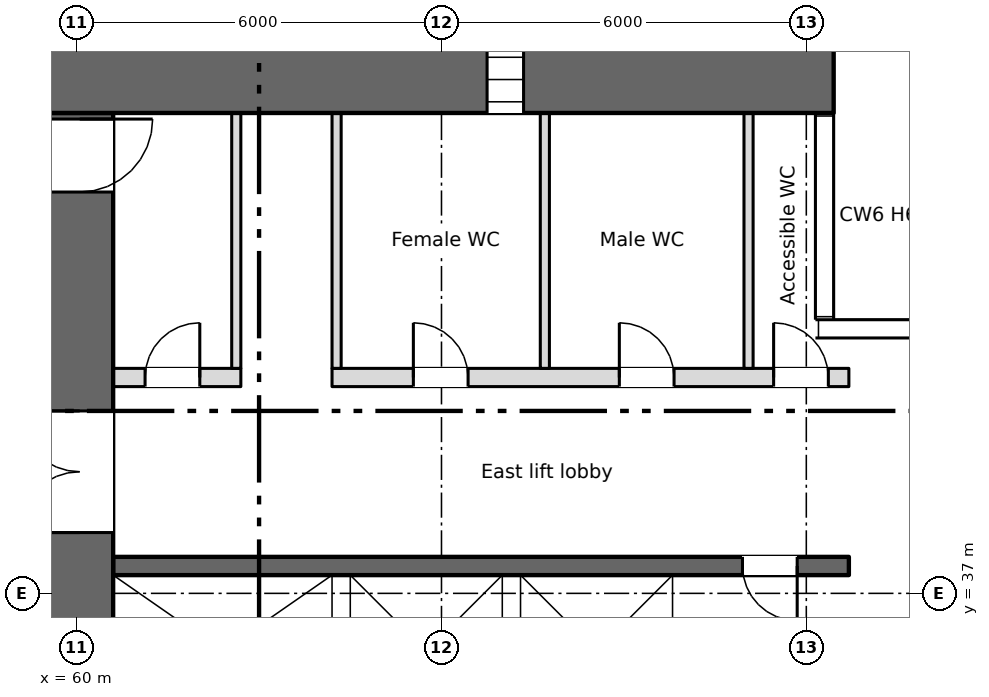
"""IFC4 building model, lengths in metres.
Left out: names, types, materials, properties, quantities, classifications, styles, units other than length and angle.
Written with IfcOpenShell. Run it as: python <this file> out.ifc"""

import sys

from ifc_helpers import new_model, si_unit, direction, frame, frame_2d, origin, place, context, subcontext, project, spatial, rectangle, extrude, element, fill, save


model = new_model("IFC4")
c1 = context("Model", 3, precision=1e-05, world=origin(), true_north=direction((0.0, 1.0)))
c2 = subcontext(c1, "Body", "Model", "MODEL_VIEW")
j1 = project(units=[si_unit("LENGTHUNIT", "METRE"), si_unit("PLANEANGLEUNIT", "RADIAN")], contexts=[c1])
p1 = place(None, origin())
s1 = spatial("IfcSite", under=j1, at=p1, CompositionType="ELEMENT")
p2 = place(p1, origin())
s2 = spatial("IfcBuilding", under=s1, at=p2, CompositionType="ELEMENT")
p3 = place(p2, frame((0.0, 0.0, 11.3)))
s3 = spatial("IfcBuildingStorey", under=s2, at=p3, CompositionType="ELEMENT", Elevation=11.3)
p4 = place(p3, frame((5.55, 45.45, 0.0), z_axis=(0.0, 0.0, 1.0), x_axis=(1.0, 0.0, 0.0)))
e1 = element("IfcWall", 1, at=p4, inside=s3, PredefinedType="SHEAR", context=c2, shape_type="SweptSolid", body=[
    extrude(rectangle(XDim=66.9, YDim=1.1, at=frame_2d((33.45, 0.0))), origin(), (0.0, 0.0, 1.0), 6.1),
])
p5 = place(p4, frame((1.2, 0.0, 0.6)))
e2 = element("IfcOpeningElement", 2, at=p5, cuts=e1, PredefinedType="OPENING", context=c2, shape_type="SweptSolid", body=[
    extrude(rectangle(XDim=0.6, YDim=2.7, at=frame_2d((0.3, 1.35))), frame((0.0, 0.56, 0.0), z_axis=(0.0, -1.0, 0.0), x_axis=(1.0, 0.0, 0.0)), (0.0, 0.0, 1.0), 1.12),
])
p6 = place(p4, frame((7.2, 0.0, 0.6)))
e3 = element("IfcOpeningElement", 3, at=p6, cuts=e1, PredefinedType="OPENING", context=c2, shape_type="SweptSolid", body=[
    extrude(rectangle(XDim=0.6, YDim=2.7, at=frame_2d((0.3, 1.35))), frame((0.0, 0.56, 0.0), z_axis=(0.0, -1.0, 0.0), x_axis=(1.0, 0.0, 0.0)), (0.0, 0.0, 1.0), 1.12),
])
p7 = place(p4, frame((61.2, 0.0, 0.6)))
e4 = element("IfcOpeningElement", 4, at=p7, cuts=e1, PredefinedType="OPENING", context=c2, shape_type="SweptSolid", body=[
    extrude(rectangle(XDim=0.6, YDim=2.7, at=frame_2d((0.3, 1.35))), frame((0.0, 0.56, 0.0), z_axis=(0.0, -1.0, 0.0), x_axis=(1.0, 0.0, 0.0)), (0.0, 0.0, 1.0), 1.12),
])
p8 = place(p3, frame((72.85, 28.4, 0.0), z_axis=(0.0, 0.0, 1.0), x_axis=(0.0, 1.0, 0.0)))
e5 = element("IfcWall", 5, at=p8, inside=s3, PredefinedType="SHEAR", context=c2, shape_type="SweptSolid", body=[
    extrude(rectangle(XDim=12.85, YDim=0.3, at=frame_2d((6.425, 0.0))), origin(), (0.0, 0.0, 1.0), 6.1),
])
p9 = place(p3, frame((64.35, 34.8, 0.0), z_axis=(0.0, 0.0, 1.0), x_axis=(0.0, 1.0, 0.0)))
e6 = element("IfcWall", 6, at=p9, inside=s3, PredefinedType="SHEAR", context=c2, shape_type="SweptSolid", body=[
    extrude(rectangle(XDim=2.5, YDim=0.3, at=frame_2d((1.25, 0.0))), origin(), (0.0, 0.0, 1.0), 6.1),
])
p10 = place(p3, frame((60.05, 28.4, 0.0), z_axis=(0.0, 0.0, 1.0), x_axis=(0.0, 1.0, 0.0)))
e7 = element("IfcWall", 7, at=p10, inside=s3, PredefinedType="SHEAR", context=c2, shape_type="SweptSolid", body=[
    extrude(rectangle(XDim=16.5, YDim=1.1, at=frame_2d((8.25, 0.0))), origin(), (0.0, 0.0, 1.0), 6.1),
])
p11 = place(p10, frame((9.6, 0.0, 0.0)))
e8 = element("IfcOpeningElement", 8, at=p11, cuts=e7, PredefinedType="OPENING", context=c2, shape_type="SweptSolid", body=[
    extrude(rectangle(XDim=2.0, YDim=2.1, at=frame_2d((1.0, 1.05))), frame((0.0, 0.56, 0.0), z_axis=(0.0, -1.0, 0.0), x_axis=(1.0, 0.0, 0.0)), (0.0, 0.0, 1.0), 1.12),
])
p12 = place(p10, frame((15.2, 0.0, 0.0)))
e9 = element("IfcOpeningElement", 9, at=p12, cuts=e7, PredefinedType="OPENING", context=c2, shape_type="SweptSolid", body=[
    extrude(rectangle(XDim=1.2, YDim=2.1, at=frame_2d((0.6, 1.05))), frame((0.0, 0.56, 0.0), z_axis=(0.0, -1.0, 0.0), x_axis=(1.0, 0.0, 0.0)), (0.0, 0.0, 1.0), 1.12),
])
p13 = place(p3, frame((72.7, 37.45, 0.0), z_axis=(0.0, 0.0, 1.0), x_axis=(-1.0, 0.0, 0.0)))
e10 = element("IfcWall", 10, at=p13, inside=s3, PredefinedType="SHEAR", context=c2, shape_type="SweptSolid", body=[
    extrude(rectangle(XDim=12.1, YDim=0.3, at=frame_2d((6.05, 0.0))), origin(), (0.0, 0.0, 1.0), 6.1),
])
p14 = place(p13, frame((0.85, 0.0, 0.0)))
e11 = element("IfcOpeningElement", 11, at=p14, cuts=e10, PredefinedType="OPENING", context=c2, shape_type="SweptSolid", body=[
    extrude(rectangle(XDim=0.9, YDim=2.1, at=frame_2d((0.45, 1.05))), frame((0.0, 0.16, 0.0), z_axis=(0.0, -1.0, 0.0), x_axis=(1.0, 0.0, 0.0)), (0.0, 0.0, 1.0), 0.32),
])
p15 = place(p13, frame((9.75, 0.0, 0.0)))
e12 = element("IfcOpeningElement", 12, at=p15, cuts=e10, PredefinedType="OPENING", context=c2, shape_type="SweptSolid", body=[
    extrude(rectangle(XDim=1.1, YDim=2.1, at=frame_2d((0.55, 1.05))), frame((0.0, 0.16, 0.0), z_axis=(0.0, -1.0, 0.0), x_axis=(1.0, 0.0, 0.0)), (0.0, 0.0, 1.0), 0.32),
])
p16 = place(p13, frame((6.4, 0.0, 0.0)))
e13 = element("IfcOpeningElement", 13, at=p16, cuts=e10, PredefinedType="OPENING", context=c2, shape_type="SweptSolid", body=[
    extrude(rectangle(XDim=1.1, YDim=2.1, at=frame_2d((0.55, 1.05))), frame((0.0, 0.16, 0.0), z_axis=(0.0, -1.0, 0.0), x_axis=(1.0, 0.0, 0.0)), (0.0, 0.0, 1.0), 0.32),
])
p17 = place(p13, frame((3.6, 0.0, 0.0)))
e14 = element("IfcOpeningElement", 14, at=p17, cuts=e10, PredefinedType="OPENING", context=c2, shape_type="SweptSolid", body=[
    extrude(rectangle(XDim=1.1, YDim=2.1, at=frame_2d((0.55, 1.05))), frame((0.0, 0.16, 0.0), z_axis=(0.0, -1.0, 0.0), x_axis=(1.0, 0.0, 0.0)), (0.0, 0.0, 1.0), 0.32),
])
p18 = place(p3, frame((60.6, 40.55, 0.0), z_axis=(0.0, 0.0, 1.0), x_axis=(1.0, 0.0, 0.0)))
e15 = element("IfcWall", 15, at=p18, inside=s3, PredefinedType="PARTITIONING", context=c2, shape_type="SweptSolid", body=[
    extrude(rectangle(XDim=2.1, YDim=0.3, at=frame_2d((1.05, 0.0))), origin(), (0.0, 0.0, 1.0), 6.1),
])
p19 = place(p18, frame((0.525, 0.0, 0.0)))
e16 = element("IfcOpeningElement", 16, at=p19, cuts=e15, PredefinedType="OPENING", context=c2, shape_type="SweptSolid", body=[
    extrude(rectangle(XDim=0.9, YDim=2.1, at=frame_2d((0.45, 1.05))), frame((0.0, 0.16, 0.0), z_axis=(0.0, -1.0, 0.0), x_axis=(1.0, 0.0, 0.0)), (0.0, 0.0, 1.0), 0.32),
])
p20 = place(p3, frame((64.2, 40.55, 0.0), z_axis=(0.0, 0.0, 1.0), x_axis=(1.0, 0.0, 0.0)))
e17 = element("IfcWall", 17, at=p20, inside=s3, PredefinedType="PARTITIONING", context=c2, shape_type="SweptSolid", body=[
    extrude(rectangle(XDim=8.5, YDim=0.3, at=frame_2d((4.25, 0.0))), origin(), (0.0, 0.0, 1.0), 6.1),
])
p21 = place(p20, frame((1.337, 0.0, 0.0)))
e18 = element("IfcOpeningElement", 18, at=p21, cuts=e17, PredefinedType="OPENING", context=c2, shape_type="SweptSolid", body=[
    extrude(rectangle(XDim=0.9, YDim=2.1, at=frame_2d((0.45, 1.05))), frame((0.0, 0.16, 0.0), z_axis=(0.0, -1.0, 0.0), x_axis=(1.0, 0.0, 0.0)), (0.0, 0.0, 1.0), 0.32),
])
p22 = place(p20, frame((4.725, 0.0, 0.0)))
e19 = element("IfcOpeningElement", 19, at=p22, cuts=e17, PredefinedType="OPENING", context=c2, shape_type="SweptSolid", body=[
    extrude(rectangle(XDim=0.9, YDim=2.1, at=frame_2d((0.45, 1.05))), frame((0.0, 0.16, 0.0), z_axis=(0.0, -1.0, 0.0), x_axis=(1.0, 0.0, 0.0)), (0.0, 0.0, 1.0), 0.32),
])
p23 = place(p20, frame((7.262, 0.0, 0.0)))
e20 = element("IfcOpeningElement", 20, at=p23, cuts=e17, PredefinedType="OPENING", context=c2, shape_type="SweptSolid", body=[
    extrude(rectangle(XDim=0.9, YDim=2.1, at=frame_2d((0.45, 1.05))), frame((0.0, 0.16, 0.0), z_axis=(0.0, -1.0, 0.0), x_axis=(1.0, 0.0, 0.0)), (0.0, 0.0, 1.0), 0.32),
])
for number, where, z_axis, x_axis in (
    (21, (67.15, 34.8, 0.0), (0.0, 0.0, 1.0), (0.0, 1.0, 0.0)),
    (22, (69.95, 34.8, 0.0), (0.0, 0.0, 1.0), (0.0, 1.0, 0.0)),
):
    element("IfcWall", number, at=place(p3, frame(where, z_axis=z_axis, x_axis=x_axis)), inside=s3, PredefinedType="SHEAR", context=c2, shape_type="SweptSolid", body=[
        extrude(rectangle(XDim=2.5, YDim=0.3, at=frame_2d((1.25, 0.0))), origin(), (0.0, 0.0, 1.0), 6.1),
    ])
for number, where, z_axis, x_axis in (
    (23, (62.625, 40.7, 0.0), (0.0, 0.0, 1.0), (0.0, 1.0, 0.0)),
    (24, (64.275, 40.7, 0.0), (0.0, 0.0, 1.0), (0.0, 1.0, 0.0)),
    (25, (67.7, 40.7, 0.0), (0.0, 0.0, 1.0), (0.0, 1.0, 0.0)),
    (26, (71.05, 40.7, 0.0), (0.0, 0.0, 1.0), (0.0, 1.0, 0.0)),
):
    element("IfcWall", number, at=place(p3, frame(where, z_axis=z_axis, x_axis=x_axis)), inside=s3, PredefinedType="PARTITIONING", context=c2, shape_type="SweptSolid", body=[
        extrude(rectangle(XDim=4.2, YDim=0.15, at=frame_2d((2.1, 0.0))), origin(), (0.0, 0.0, 1.0), 6.1),
    ])
p24 = place(p7, origin())
e27 = element("IfcWindow", 27, at=p24, inside=s3, PartitioningType="SINGLE_PANEL", PredefinedType="WINDOW", context=c2, shape_type="SweptSolid", body=[
    extrude(rectangle(XDim=0.6, YDim=2.7, at=frame_2d((0.3, 1.35))), frame((0.0, 0.03, 0.0), z_axis=(0.0, -1.0, 0.0), x_axis=(1.0, 0.0, 0.0)), (0.0, 0.0, 1.0), 0.06),
])
fill(e4, e27)
p25 = place(p19, origin())
e28 = element("IfcDoor", 28, at=p25, inside=s3, OperationType="SINGLE_SWING_RIGHT", PredefinedType="DOOR", context=c2, shape_type="SweptSolid", body=[
    extrude(rectangle(XDim=0.9, YDim=2.1, at=frame_2d((0.45, 1.05))), frame((0.0, 0.025, 0.0), z_axis=(0.0, -1.0, 0.0), x_axis=(1.0, 0.0, 0.0)), (0.0, 0.0, 1.0), 0.05),
])
fill(e16, e28)
p26 = place(p21, origin())
e29 = element("IfcDoor", 29, at=p26, inside=s3, OperationType="SINGLE_SWING_LEFT", PredefinedType="DOOR", context=c2, shape_type="SweptSolid", body=[
    extrude(rectangle(XDim=0.9, YDim=2.1, at=frame_2d((0.45, 1.05))), frame((0.0, 0.025, 0.0), z_axis=(0.0, -1.0, 0.0), x_axis=(1.0, 0.0, 0.0)), (0.0, 0.0, 1.0), 0.05),
])
fill(e18, e29)
p27 = place(p22, origin())
e30 = element("IfcDoor", 30, at=p27, inside=s3, OperationType="SINGLE_SWING_LEFT", PredefinedType="DOOR", context=c2, shape_type="SweptSolid", body=[
    extrude(rectangle(XDim=0.9, YDim=2.1, at=frame_2d((0.45, 1.05))), frame((0.0, 0.025, 0.0), z_axis=(0.0, -1.0, 0.0), x_axis=(1.0, 0.0, 0.0)), (0.0, 0.0, 1.0), 0.05),
])
fill(e19, e30)
p28 = place(p23, origin())
e31 = element("IfcDoor", 31, at=p28, inside=s3, OperationType="SINGLE_SWING_LEFT", PredefinedType="DOOR", context=c2, shape_type="SweptSolid", body=[
    extrude(rectangle(XDim=0.9, YDim=2.1, at=frame_2d((0.45, 1.05))), frame((0.0, 0.025, 0.0), z_axis=(0.0, -1.0, 0.0), x_axis=(1.0, 0.0, 0.0)), (0.0, 0.0, 1.0), 0.05),
])
fill(e20, e31)
p29 = place(p14, origin())
e32 = element("IfcDoor", 32, at=p29, inside=s3, OperationType="SINGLE_SWING_LEFT", PredefinedType="DOOR", context=c2, shape_type="SweptSolid", body=[
    extrude(rectangle(XDim=0.9, YDim=2.1, at=frame_2d((0.45, 1.05))), frame((0.0, 0.025, 0.0), z_axis=(0.0, -1.0, 0.0), x_axis=(1.0, 0.0, 0.0)), (0.0, 0.0, 1.0), 0.05),
])
fill(e11, e32)
p30 = place(p15, origin())
e33 = element("IfcDoor", 33, at=p30, inside=s3, OperationType="SLIDING_TO_LEFT", PredefinedType="DOOR", context=c2, shape_type="SweptSolid", body=[
    extrude(rectangle(XDim=1.1, YDim=2.1, at=frame_2d((0.55, 1.05))), frame((0.0, 0.025, 0.0), z_axis=(0.0, -1.0, 0.0), x_axis=(1.0, 0.0, 0.0)), (0.0, 0.0, 1.0), 0.05),
])
fill(e12, e33)
p31 = place(p16, origin())
e34 = element("IfcDoor", 34, at=p31, inside=s3, OperationType="SLIDING_TO_LEFT", PredefinedType="DOOR", context=c2, shape_type="SweptSolid", body=[
    extrude(rectangle(XDim=1.1, YDim=2.1, at=frame_2d((0.55, 1.05))), frame((0.0, 0.025, 0.0), z_axis=(0.0, -1.0, 0.0), x_axis=(1.0, 0.0, 0.0)), (0.0, 0.0, 1.0), 0.05),
])
fill(e13, e34)
p32 = place(p17, origin())
e35 = element("IfcDoor", 35, at=p32, inside=s3, OperationType="SLIDING_TO_LEFT", PredefinedType="DOOR", context=c2, shape_type="SweptSolid", body=[
    extrude(rectangle(XDim=1.1, YDim=2.1, at=frame_2d((0.55, 1.05))), frame((0.0, 0.025, 0.0), z_axis=(0.0, -1.0, 0.0), x_axis=(1.0, 0.0, 0.0)), (0.0, 0.0, 1.0), 0.05),
])
fill(e14, e35)
p33 = place(p11, origin())
e36 = element("IfcDoor", 36, at=p33, inside=s3, OperationType="DOUBLE_DOOR_SINGLE_SWING", PredefinedType="DOOR", context=c2, shape_type="SweptSolid", body=[
    extrude(rectangle(XDim=2.0, YDim=2.1, at=frame_2d((1.0, 1.05))), frame((0.0, 0.025, 0.0), z_axis=(0.0, -1.0, 0.0), x_axis=(1.0, 0.0, 0.0)), (0.0, 0.0, 1.0), 0.05),
])
fill(e8, e36)
p34 = place(p12, origin())
e37 = element("IfcDoor", 37, at=p34, inside=s3, OperationType="SINGLE_SWING_RIGHT", PredefinedType="DOOR", context=c2, shape_type="SweptSolid", body=[
    extrude(rectangle(XDim=1.2, YDim=2.1, at=frame_2d((0.6, 1.05))), frame((0.0, 0.025, 0.0), z_axis=(0.0, -1.0, 0.0), x_axis=(1.0, 0.0, 0.0)), (0.0, 0.0, 1.0), 0.05),
])
fill(e9, e37)
save(model, sys.argv[1])
